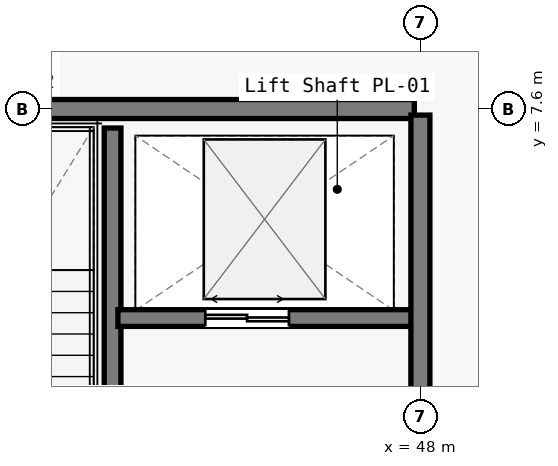
"""IFC4 building model, lengths in metres.
Left out: names, types, materials, properties, quantities, classifications, styles, units other than length and angle.
Written with IfcOpenShell. Run it as: python <this file> out.ifc"""

import sys

from ifc_helpers import new_model, si_unit, direction, frame, frame_2d, origin, place, context, subcontext, project, spatial, rectangle, extrude, element, fill, save


model = new_model("IFC4")
c1 = context("Model", 3, precision=1e-05, world=origin(), true_north=direction((0.0, 1.0)))
c2 = subcontext(c1, "Body", "Model", "MODEL_VIEW")
j1 = project(units=[si_unit("LENGTHUNIT", "METRE"), si_unit("PLANEANGLEUNIT", "RADIAN")], contexts=[c1])
p1 = place(None, origin())
s1 = spatial("IfcSite", under=j1, at=p1, CompositionType="ELEMENT")
p2 = place(p1, origin())
s2 = spatial("IfcBuilding", under=s1, at=p2, CompositionType="ELEMENT")
p3 = place(p2, frame((0.0, 0.0, 10.2)))
s3 = spatial("IfcBuildingStorey", under=s2, at=p3, CompositionType="ELEMENT", Elevation=10.2)
p4 = place(p3, frame((40.15, 7.6, 0.0), z_axis=(0.0, 0.0, 1.0), x_axis=(1.0, 0.0, 0.0)))
e1 = element("IfcWall", 1, at=p4, inside=s3, PredefinedType="SOLIDWALL", context=c2, shape_type="SweptSolid", body=[
    extrude(rectangle(XDim=7.77, YDim=0.25, at=frame_2d((3.885, 0.0))), origin(), (0.0, 0.0, 1.0), 3.41),
])
p5 = place(p3, frame((43.95, 0.25, 0.0), z_axis=(0.0, 0.0, 1.0), x_axis=(0.0, 1.0, 0.0)))
e2 = element("IfcWall", 2, at=p5, inside=s3, PredefinedType="SOLIDWALL", context=c2, shape_type="SweptSolid", body=[
    extrude(rectangle(XDim=7.1, YDim=0.22, at=frame_2d((3.55, 0.0))), origin(), (0.0, 0.0, 1.0), 4.52),
])
p6 = place(p5, frame((0.35, 0.0, 0.0)))
e3 = element("IfcOpeningElement", 3, at=p6, cuts=e2, PredefinedType="OPENING", context=c2, shape_type="SweptSolid", body=[
    extrude(rectangle(XDim=1.2, YDim=2.15, at=frame_2d((0.6, 1.075))), frame((0.0, 0.12, 0.0), z_axis=(0.0, -1.0, 0.0), x_axis=(1.0, 0.0, 0.0)), (0.0, 0.0, 1.0), 0.24),
])
p7 = place(p3, frame((44.02, 4.85, 0.0), z_axis=(0.0, 0.0, 1.0), x_axis=(1.0, 0.0, 0.0)))
e4 = element("IfcWall", 4, at=p7, inside=s3, PredefinedType="SOLIDWALL", context=c2, shape_type="SweptSolid", body=[
    extrude(rectangle(XDim=3.93, YDim=0.22, at=frame_2d((1.965, 0.0))), origin(), (0.0, 0.0, 1.0), 3.935),
])
p8 = place(p7, frame((1.15, 0.0, 0.0)))
e5 = element("IfcOpeningElement", 5, at=p8, cuts=e4, PredefinedType="OPENING", context=c2, shape_type="SweptSolid", body=[
    extrude(rectangle(XDim=1.1, YDim=2.2, at=frame_2d((0.55, 1.1))), frame((0.0, 0.12, 0.0), z_axis=(0.0, -1.0, 0.0), x_axis=(1.0, 0.0, 0.0)), (0.0, 0.0, 1.0), 0.24),
])
p9 = place(p3, frame((48.0, 0.08, 0.0), z_axis=(0.0, 0.0, 1.0), x_axis=(0.0, 1.0, 0.0)))
e6 = element("IfcWall", 6, at=p9, inside=s3, PredefinedType="SOLIDWALL", context=c2, shape_type="SweptSolid", body=[
    extrude(rectangle(XDim=7.44, YDim=0.25, at=frame_2d((3.72, 0.0))), origin(), (0.0, 0.0, 1.0), 3.41),
])
p10 = place(p9, frame((2.27, 0.0, 0.0)))
e7 = element("IfcOpeningElement", 7, at=p10, cuts=e6, PredefinedType="OPENING", context=c2, shape_type="SweptSolid", body=[
    extrude(rectangle(XDim=1.35, YDim=2.2, at=frame_2d((0.675, 1.1))), frame((0.0, 0.135, 0.0), z_axis=(0.0, -1.0, 0.0), x_axis=(1.0, 0.0, 0.0)), (0.0, 0.0, 1.0), 0.27),
])
p11 = place(p8, origin())
e8 = element("IfcDoor", 8, at=p11, inside=s3, OperationType="DOUBLE_DOOR_SLIDING", PredefinedType="DOOR", context=c2, shape_type="SweptSolid", body=[
    extrude(rectangle(XDim=1.1, YDim=2.2, at=frame_2d((0.55, 1.1))), frame((0.0, 0.025, 0.0), z_axis=(0.0, -1.0, 0.0), x_axis=(1.0, 0.0, 0.0)), (0.0, 0.0, 1.0), 0.05),
])
fill(e5, e8)
save(model, sys.argv[1])
